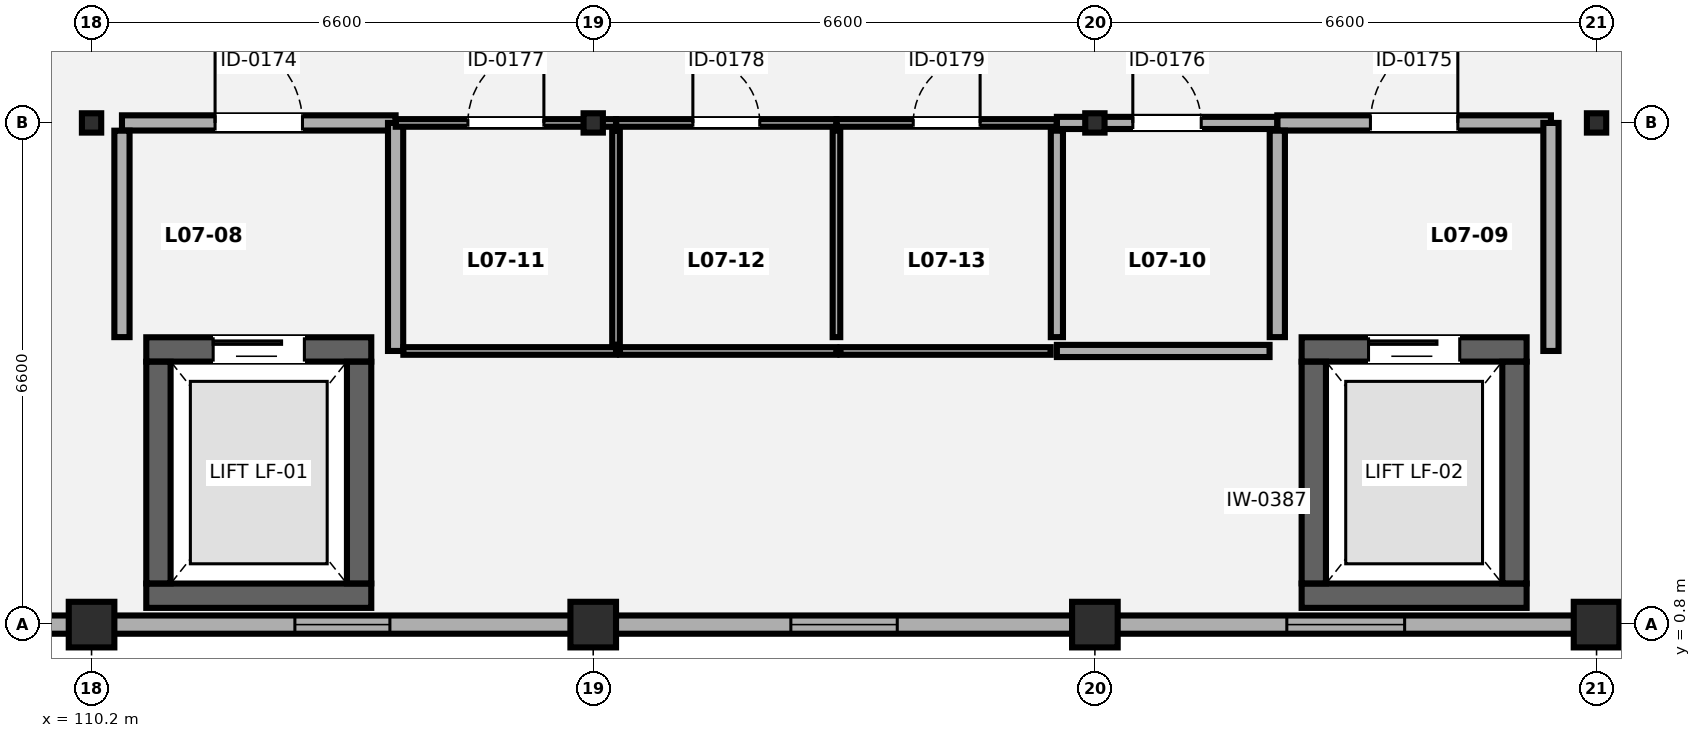
"""IFC4 building model, lengths in metres.
Left out: names, types, materials, properties, quantities, classifications, styles, units other than length and angle.
Written with IfcOpenShell. Run it as: python <this file> out.ifc"""

import sys

from ifc_helpers import new_model, si_unit, direction, frame, frame_2d, origin, origin_2d, place, context, subcontext, project, spatial, rectangle, circle, i_section, extrude, element, fill, save


model = new_model("IFC4")
c1 = context("Model", 3, precision=1e-05, world=origin(), true_north=direction((0.0, 1.0)))
c2 = subcontext(c1, "Body", "Model", "MODEL_VIEW")
j1 = project(units=[si_unit("LENGTHUNIT", "METRE"), si_unit("PLANEANGLEUNIT", "RADIAN")], contexts=[c1])
p1 = place(None, origin())
s1 = spatial("IfcSite", under=j1, at=p1, CompositionType="ELEMENT")
p2 = place(p1, origin())
s2 = spatial("IfcBuilding", under=s1, at=p2, CompositionType="ELEMENT")
p3 = place(p2, frame((0.0, 0.0, 30.1)))
s3 = spatial("IfcBuildingStorey", under=s2, at=p3, CompositionType="ELEMENT", Elevation=30.1)
p4 = place(p3, frame((110.2, 0.8, 0.0), z_axis=(0.0, 0.0, 1.0), x_axis=(1.0, 0.0, 0.0)))
e1 = element("IfcColumn", 1, at=p4, inside=s3, PredefinedType="PILASTER", context=c2, shape_type="SweptSolid", body=[
    extrude(circle(Radius=0.3, at=origin_2d()), origin(), (0.0, 0.0, 1.0), 4.2),
])
p5 = place(p3, frame((110.2, 7.4, 0.0), z_axis=(0.0, 0.0, 1.0), x_axis=(1.0, 0.0, 0.0)))
e2 = element("IfcColumn", 2, at=p5, inside=s3, PredefinedType="COLUMN", context=c2, shape_type="SweptSolid", body=[
    extrude(i_section(OverallWidth=0.254, OverallDepth=0.254, WebThickness=0.009, FlangeThickness=0.014, FilletRadius=0.014, at=origin_2d()), origin(), (0.0, 0.0, 1.0), 4.2),
])
p6 = place(p3, frame((116.8, 0.8, 0.0), z_axis=(0.0, 0.0, 1.0), x_axis=(1.0, 0.0, 0.0)))
e3 = element("IfcColumn", 3, at=p6, inside=s3, PredefinedType="PILASTER", context=c2, shape_type="SweptSolid", body=[
    extrude(circle(Radius=0.3, at=origin_2d()), origin(), (0.0, 0.0, 1.0), 4.2),
])
p7 = place(p3, frame((116.8, 7.4, 0.0), z_axis=(0.0, 0.0, 1.0), x_axis=(1.0, 0.0, 0.0)))
e4 = element("IfcColumn", 4, at=p7, inside=s3, PredefinedType="COLUMN", context=c2, shape_type="SweptSolid", body=[
    extrude(i_section(OverallWidth=0.254, OverallDepth=0.254, WebThickness=0.009, FlangeThickness=0.014, FilletRadius=0.014, at=origin_2d()), origin(), (0.0, 0.0, 1.0), 4.2),
])
p8 = place(p3, frame((123.4, 0.8, 0.0), z_axis=(0.0, 0.0, 1.0), x_axis=(1.0, 0.0, 0.0)))
e5 = element("IfcColumn", 5, at=p8, inside=s3, PredefinedType="PILASTER", context=c2, shape_type="SweptSolid", body=[
    extrude(circle(Radius=0.3, at=origin_2d()), origin(), (0.0, 0.0, 1.0), 4.2),
])
p9 = place(p3, frame((123.4, 7.4, 0.0), z_axis=(0.0, 0.0, 1.0), x_axis=(1.0, 0.0, 0.0)))
e6 = element("IfcColumn", 6, at=p9, inside=s3, PredefinedType="COLUMN", context=c2, shape_type="SweptSolid", body=[
    extrude(i_section(OverallWidth=0.254, OverallDepth=0.254, WebThickness=0.009, FlangeThickness=0.014, FilletRadius=0.014, at=origin_2d()), origin(), (0.0, 0.0, 1.0), 4.2),
])
p10 = place(p3, frame((130.0, 0.8, 0.0), z_axis=(0.0, 0.0, 1.0), x_axis=(1.0, 0.0, 0.0)))
e7 = element("IfcColumn", 7, at=p10, inside=s3, PredefinedType="PILASTER", context=c2, shape_type="SweptSolid", body=[
    extrude(circle(Radius=0.3, at=origin_2d()), origin(), (0.0, 0.0, 1.0), 4.2),
])
p11 = place(p3, frame((130.0, 7.4, 0.0), z_axis=(0.0, 0.0, 1.0), x_axis=(1.0, 0.0, 0.0)))
e8 = element("IfcColumn", 8, at=p11, inside=s3, PredefinedType="COLUMN", context=c2, shape_type="SweptSolid", body=[
    extrude(i_section(OverallWidth=0.254, OverallDepth=0.254, WebThickness=0.009, FlangeThickness=0.014, FilletRadius=0.014, at=origin_2d()), origin(), (0.0, 0.0, 1.0), 4.2),
])
p12 = place(p3, frame((156.102, 0.8, 0.0), z_axis=(0.0, 0.0, 1.0), x_axis=(-1.0, 0.0, 0.0)))
e9 = element("IfcWall", 9, at=p12, inside=s3, PredefinedType="SOLIDWALL", context=c2, shape_type="SweptSolid", body=[
    extrude(rectangle(XDim=52.204, YDim=0.24, at=frame_2d((26.102, 0.0))), origin(), (0.0, 0.0, 1.0), 3.505),
])
p13 = place(p12, frame((48.652, 0.0, 0.85)))
e10 = element("IfcOpeningElement", 10, at=p13, cuts=e9, PredefinedType="OPENING", context=c2, shape_type="SweptSolid", body=[
    extrude(rectangle(XDim=1.1, YDim=1.4, at=frame_2d((0.55, 0.7))), frame((0.0, 0.13, 0.0), z_axis=(0.0, -1.0, 0.0), x_axis=(1.0, 0.0, 0.0)), (0.0, 0.0, 1.0), 0.26),
])
p14 = place(p12, frame((41.977, 0.0, 0.85)))
e11 = element("IfcOpeningElement", 11, at=p14, cuts=e9, PredefinedType="OPENING", context=c2, shape_type="SweptSolid", body=[
    extrude(rectangle(XDim=1.25, YDim=1.4, at=frame_2d((0.625, 0.7))), frame((0.0, 0.13, 0.0), z_axis=(0.0, -1.0, 0.0), x_axis=(1.0, 0.0, 0.0)), (0.0, 0.0, 1.0), 0.26),
])
p15 = place(p12, frame((35.302, 0.0, 0.85)))
e12 = element("IfcOpeningElement", 12, at=p15, cuts=e9, PredefinedType="OPENING", context=c2, shape_type="SweptSolid", body=[
    extrude(rectangle(XDim=1.4, YDim=1.4, at=frame_2d((0.7, 0.7))), frame((0.0, 0.13, 0.0), z_axis=(0.0, -1.0, 0.0), x_axis=(1.0, 0.0, 0.0)), (0.0, 0.0, 1.0), 0.26),
])
p16 = place(p12, frame((28.627, 0.0, 0.85)))
e13 = element("IfcOpeningElement", 13, at=p16, cuts=e9, PredefinedType="OPENING", context=c2, shape_type="SweptSolid", body=[
    extrude(rectangle(XDim=1.55, YDim=1.4, at=frame_2d((0.775, 0.7))), frame((0.0, 0.13, 0.0), z_axis=(0.0, -1.0, 0.0), x_axis=(1.0, 0.0, 0.0)), (0.0, 0.0, 1.0), 0.26),
])
p17 = place(p12, frame((21.952, 0.0, 0.85)))
e14 = element("IfcOpeningElement", 14, at=p17, cuts=e9, PredefinedType="OPENING", context=c2, shape_type="SweptSolid", body=[
    extrude(rectangle(XDim=1.7, YDim=1.4, at=frame_2d((0.85, 0.7))), frame((0.0, 0.13, 0.0), z_axis=(0.0, -1.0, 0.0), x_axis=(1.0, 0.0, 0.0)), (0.0, 0.0, 1.0), 0.26),
])
p18 = place(p12, frame((15.277, 0.0, 0.85)))
e15 = element("IfcOpeningElement", 15, at=p18, cuts=e9, PredefinedType="OPENING", context=c2, shape_type="SweptSolid", body=[
    extrude(rectangle(XDim=1.85, YDim=1.4, at=frame_2d((0.925, 0.7))), frame((0.0, 0.13, 0.0), z_axis=(0.0, -1.0, 0.0), x_axis=(1.0, 0.0, 0.0)), (0.0, 0.0, 1.0), 0.26),
])
p19 = place(p12, frame((8.602, 0.0, 0.85)))
e16 = element("IfcOpeningElement", 16, at=p19, cuts=e9, PredefinedType="OPENING", context=c2, shape_type="SweptSolid", body=[
    extrude(rectangle(XDim=2.0, YDim=1.4, at=frame_2d((1.0, 0.7))), frame((0.0, 0.13, 0.0), z_axis=(0.0, -1.0, 0.0), x_axis=(1.0, 0.0, 0.0)), (0.0, 0.0, 1.0), 0.26),
])
p20 = place(p12, frame((1.927, 0.0, 0.85)))
e17 = element("IfcOpeningElement", 17, at=p20, cuts=e9, PredefinedType="OPENING", context=c2, shape_type="SweptSolid", body=[
    extrude(rectangle(XDim=2.15, YDim=1.4, at=frame_2d((1.075, 0.7))), frame((0.0, 0.13, 0.0), z_axis=(0.0, -1.0, 0.0), x_axis=(1.0, 0.0, 0.0)), (0.0, 0.0, 1.0), 0.26),
])
p21 = place(p3, frame((110.92, 1.18, 0.0), z_axis=(0.0, 0.0, 1.0), x_axis=(1.0, 0.0, 0.0)))
e18 = element("IfcWall", 18, at=p21, inside=s3, PredefinedType="SHEAR", context=c2, shape_type="SweptSolid", body=[
    extrude(rectangle(XDim=2.96, YDim=0.32, at=frame_2d((1.48, 0.0))), origin(), (0.0, 0.0, 1.0), 4.02),
])
p22 = place(p3, frame((110.92, 4.42, 0.0), z_axis=(0.0, 0.0, 1.0), x_axis=(1.0, 0.0, 0.0)))
e19 = element("IfcWall", 19, at=p22, inside=s3, PredefinedType="SHEAR", context=c2, shape_type="SweptSolid", body=[
    extrude(rectangle(XDim=2.96, YDim=0.32, at=frame_2d((1.48, 0.0))), origin(), (0.0, 0.0, 1.0), 4.02),
])
p23 = place(p22, frame((0.88, 0.0, 0.0)))
e20 = element("IfcOpeningElement", 20, at=p23, cuts=e19, PredefinedType="OPENING", context=c2, shape_type="SweptSolid", body=[
    extrude(rectangle(XDim=1.2, YDim=2.2, at=frame_2d((0.6, 1.1))), frame((0.0, 0.17, 0.0), z_axis=(0.0, -1.0, 0.0), x_axis=(1.0, 0.0, 0.0)), (0.0, 0.0, 1.0), 0.34),
])
for number, where, z_axis, x_axis in (
    (21, (111.08, 1.342, 0.0), (0.0, 0.0, 1.0), (0.0, 1.0, 0.0)),
    (22, (113.72, 1.342, 0.0), (0.0, 0.0, 1.0), (0.0, 1.0, 0.0)),
):
    element("IfcWall", number, at=place(p3, frame(where, z_axis=z_axis, x_axis=x_axis)), inside=s3, PredefinedType="SHEAR", context=c2, shape_type="SweptSolid", body=[
        extrude(rectangle(XDim=2.916, YDim=0.32, at=frame_2d((1.458, 0.0))), origin(), (0.0, 0.0, 1.0), 4.02),
    ])
p24 = place(p3, frame((126.12, 1.18, 0.0), z_axis=(0.0, 0.0, 1.0), x_axis=(1.0, 0.0, 0.0)))
e23 = element("IfcWall", 23, at=p24, inside=s3, PredefinedType="SHEAR", context=c2, shape_type="SweptSolid", body=[
    extrude(rectangle(XDim=2.96, YDim=0.32, at=frame_2d((1.48, 0.0))), origin(), (0.0, 0.0, 1.0), 4.02),
])
p25 = place(p3, frame((126.12, 4.42, 0.0), z_axis=(0.0, 0.0, 1.0), x_axis=(1.0, 0.0, 0.0)))
e24 = element("IfcWall", 24, at=p25, inside=s3, PredefinedType="SHEAR", context=c2, shape_type="SweptSolid", body=[
    extrude(rectangle(XDim=2.96, YDim=0.32, at=frame_2d((1.48, 0.0))), origin(), (0.0, 0.0, 1.0), 4.02),
])
p26 = place(p25, frame((0.88, 0.0, 0.0)))
e25 = element("IfcOpeningElement", 25, at=p26, cuts=e24, PredefinedType="OPENING", context=c2, shape_type="SweptSolid", body=[
    extrude(rectangle(XDim=1.2, YDim=2.2, at=frame_2d((0.6, 1.1))), frame((0.0, 0.17, 0.0), z_axis=(0.0, -1.0, 0.0), x_axis=(1.0, 0.0, 0.0)), (0.0, 0.0, 1.0), 0.34),
])
for number, where, z_axis, x_axis in (
    (26, (126.28, 1.342, 0.0), (0.0, 0.0, 1.0), (0.0, 1.0, 0.0)),
    (27, (128.92, 1.342, 0.0), (0.0, 0.0, 1.0), (0.0, 1.0, 0.0)),
):
    element("IfcWall", number, at=place(p3, frame(where, z_axis=z_axis, x_axis=x_axis)), inside=s3, PredefinedType="SHEAR", context=c2, shape_type="SweptSolid", body=[
        extrude(rectangle(XDim=2.916, YDim=0.32, at=frame_2d((1.458, 0.0))), origin(), (0.0, 0.0, 1.0), 4.02),
    ])
p27 = place(p3, frame((110.6, 7.4, 0.0), z_axis=(0.0, 0.0, 1.0), x_axis=(1.0, 0.0, 0.0)))
e28 = element("IfcWall", 28, at=p27, inside=s3, PredefinedType="SOLIDWALL", context=c2, shape_type="SweptSolid", body=[
    extrude(rectangle(XDim=3.6, YDim=0.2, at=frame_2d((1.8, 0.0))), origin(), (0.0, 0.0, 1.0), 3.293),
])
p28 = place(p27, frame((1.225, 0.0, 0.0)))
e29 = element("IfcOpeningElement", 29, at=p28, cuts=e28, PredefinedType="OPENING", context=c2, shape_type="SweptSolid", body=[
    extrude(rectangle(XDim=1.15, YDim=2.15, at=frame_2d((0.575, 1.075))), frame((0.0, 0.11, 0.0), z_axis=(0.0, -1.0, 0.0), x_axis=(1.0, 0.0, 0.0)), (0.0, 0.0, 1.0), 0.22),
])
p29 = place(p3, frame((110.6, 4.582, 0.0), z_axis=(0.0, 0.0, 1.0), x_axis=(0.0, 1.0, 0.0)))
e30 = element("IfcWall", 30, at=p29, inside=s3, PredefinedType="SOLIDWALL", context=c2, shape_type="SweptSolid", body=[
    extrude(rectangle(XDim=2.716, YDim=0.2, at=frame_2d((1.358, 0.0))), origin(), (0.0, 0.0, 1.0), 4.02),
])
p30 = place(p3, frame((114.2, 4.4, 0.0), z_axis=(0.0, 0.0, 1.0), x_axis=(0.0, 1.0, 0.0)))
e31 = element("IfcWall", 31, at=p30, inside=s3, PredefinedType="SOLIDWALL", context=c2, shape_type="SweptSolid", body=[
    extrude(rectangle(XDim=3.0, YDim=0.2, at=frame_2d((1.5, 0.0))), origin(), (0.0, 0.0, 1.0), 4.02),
])
p31 = place(p3, frame((125.8, 7.4, 0.0), z_axis=(0.0, 0.0, 1.0), x_axis=(1.0, 0.0, 0.0)))
e32 = element("IfcWall", 32, at=p31, inside=s3, PredefinedType="SOLIDWALL", context=c2, shape_type="SweptSolid", body=[
    extrude(rectangle(XDim=3.6, YDim=0.2, at=frame_2d((1.8, 0.0))), origin(), (0.0, 0.0, 1.0), 3.293),
])
p32 = place(p31, frame((1.225, 0.0, 0.0)))
e33 = element("IfcOpeningElement", 33, at=p32, cuts=e32, PredefinedType="OPENING", context=c2, shape_type="SweptSolid", body=[
    extrude(rectangle(XDim=1.15, YDim=2.15, at=frame_2d((0.575, 1.075))), frame((0.0, 0.11, 0.0), z_axis=(0.0, -1.0, 0.0), x_axis=(1.0, 0.0, 0.0)), (0.0, 0.0, 1.0), 0.22),
])
p33 = place(p3, frame((125.8, 4.582, 0.0), z_axis=(0.0, 0.0, 1.0), x_axis=(0.0, 1.0, 0.0)))
e34 = element("IfcWall", 34, at=p33, inside=s3, PredefinedType="SOLIDWALL", context=c2, shape_type="SweptSolid", body=[
    extrude(rectangle(XDim=2.716, YDim=0.2, at=frame_2d((1.358, 0.0))), origin(), (0.0, 0.0, 1.0), 4.02),
])
p34 = place(p3, frame((129.4, 4.4, 0.0), z_axis=(0.0, 0.0, 1.0), x_axis=(0.0, 1.0, 0.0)))
e35 = element("IfcWall", 35, at=p34, inside=s3, PredefinedType="SOLIDWALL", context=c2, shape_type="SweptSolid", body=[
    extrude(rectangle(XDim=3.0, YDim=0.2, at=frame_2d((1.5, 0.0))), origin(), (0.0, 0.0, 1.0), 4.02),
])
p35 = place(p3, frame((122.9, 4.4, 0.0), z_axis=(0.0, 0.0, 1.0), x_axis=(1.0, 0.0, 0.0)))
e36 = element("IfcWall", 36, at=p35, inside=s3, PredefinedType="PARTITIONING", context=c2, shape_type="SweptSolid", body=[
    extrude(rectangle(XDim=2.798, YDim=0.16, at=frame_2d((1.399, 0.0))), origin(), (0.0, 0.0, 1.0), 3.546),
])
p36 = place(p3, frame((122.9, 7.4, 0.0), z_axis=(0.0, 0.0, 1.0), x_axis=(1.0, 0.0, 0.0)))
e37 = element("IfcWall", 37, at=p36, inside=s3, PredefinedType="PARTITIONING", context=c2, shape_type="SweptSolid", body=[
    extrude(rectangle(XDim=2.898, YDim=0.16, at=frame_2d((1.449, 0.0))), origin(), (0.0, 0.0, 1.0), 3.293),
])
p37 = place(p36, frame((0.999, 0.0, 0.0)))
e38 = element("IfcOpeningElement", 38, at=p37, cuts=e37, PredefinedType="OPENING", context=c2, shape_type="SweptSolid", body=[
    extrude(rectangle(XDim=0.9, YDim=2.1, at=frame_2d((0.45, 1.05))), frame((0.0, 0.09, 0.0), z_axis=(0.0, -1.0, 0.0), x_axis=(1.0, 0.0, 0.0)), (0.0, 0.0, 1.0), 0.18),
])
p38 = place(p3, frame((122.9, 4.582, 0.0), z_axis=(0.0, 0.0, 1.0), x_axis=(0.0, 1.0, 0.0)))
e39 = element("IfcWall", 39, at=p38, inside=s3, PredefinedType="PARTITIONING", context=c2, shape_type="SweptSolid", body=[
    extrude(rectangle(XDim=2.716, YDim=0.16, at=frame_2d((1.358, 0.0))), origin(), (0.0, 0.0, 1.0), 4.02),
])
p39 = place(p3, frame((114.302, 4.4, 0.0), z_axis=(0.0, 0.0, 1.0), x_axis=(1.0, 0.0, 0.0)))
e40 = element("IfcWall", 40, at=p39, inside=s3, PredefinedType="PARTITIONING", context=c2, shape_type="SweptSolid", body=[
    extrude(rectangle(XDim=2.798, YDim=0.1, at=frame_2d((1.399, 0.0))), origin(), (0.0, 0.0, 1.0), 4.02),
])
p40 = place(p3, frame((114.202, 7.4, 0.0), z_axis=(0.0, 0.0, 1.0), x_axis=(1.0, 0.0, 0.0)))
e41 = element("IfcWall", 41, at=p40, inside=s3, PredefinedType="PARTITIONING", context=c2, shape_type="SweptSolid", body=[
    extrude(rectangle(XDim=2.898, YDim=0.1, at=frame_2d((1.449, 0.0))), origin(), (0.0, 0.0, 1.0), 3.293),
])
p41 = place(p40, frame((0.949, 0.0, 0.0)))
e42 = element("IfcOpeningElement", 42, at=p41, cuts=e41, PredefinedType="OPENING", context=c2, shape_type="SweptSolid", body=[
    extrude(rectangle(XDim=1.0, YDim=2.1, at=frame_2d((0.5, 1.05))), frame((0.0, 0.06, 0.0), z_axis=(0.0, -1.0, 0.0), x_axis=(1.0, 0.0, 0.0)), (0.0, 0.0, 1.0), 0.12),
])
p42 = place(p3, frame((117.1, 4.482, 0.0), z_axis=(0.0, 0.0, 1.0), x_axis=(0.0, 1.0, 0.0)))
e43 = element("IfcWall", 43, at=p42, inside=s3, PredefinedType="PARTITIONING", context=c2, shape_type="SweptSolid", body=[
    extrude(rectangle(XDim=2.816, YDim=0.1, at=frame_2d((1.408, 0.0))), origin(), (0.0, 0.0, 1.0), 4.02),
])
p43 = place(p3, frame((117.152, 4.4, 0.0), z_axis=(0.0, 0.0, 1.0), x_axis=(1.0, 0.0, 0.0)))
e44 = element("IfcWall", 44, at=p43, inside=s3, PredefinedType="PARTITIONING", context=c2, shape_type="SweptSolid", body=[
    extrude(rectangle(XDim=2.848, YDim=0.1, at=frame_2d((1.424, 0.0))), origin(), (0.0, 0.0, 1.0), 4.02),
])
p44 = place(p3, frame((117.102, 7.4, 0.0), z_axis=(0.0, 0.0, 1.0), x_axis=(1.0, 0.0, 0.0)))
e45 = element("IfcWall", 45, at=p44, inside=s3, PredefinedType="PARTITIONING", context=c2, shape_type="SweptSolid", body=[
    extrude(rectangle(XDim=2.898, YDim=0.1, at=frame_2d((1.449, 0.0))), origin(), (0.0, 0.0, 1.0), 3.293),
])
p45 = place(p44, frame((1.009, 0.0, 0.0)))
e46 = element("IfcOpeningElement", 46, at=p45, cuts=e45, PredefinedType="OPENING", context=c2, shape_type="SweptSolid", body=[
    extrude(rectangle(XDim=0.88, YDim=2.08, at=frame_2d((0.44, 1.04))), frame((0.0, 0.06, 0.0), z_axis=(0.0, -1.0, 0.0), x_axis=(1.0, 0.0, 0.0)), (0.0, 0.0, 1.0), 0.12),
])
p46 = place(p3, frame((120.0, 4.582, 0.0), z_axis=(0.0, 0.0, 1.0), x_axis=(0.0, 1.0, 0.0)))
e47 = element("IfcWall", 47, at=p46, inside=s3, PredefinedType="PARTITIONING", context=c2, shape_type="SweptSolid", body=[
    extrude(rectangle(XDim=2.716, YDim=0.1, at=frame_2d((1.358, 0.0))), origin(), (0.0, 0.0, 1.0), 4.02),
])
p47 = place(p3, frame((120.052, 4.4, 0.0), z_axis=(0.0, 0.0, 1.0), x_axis=(1.0, 0.0, 0.0)))
e48 = element("IfcWall", 48, at=p47, inside=s3, PredefinedType="PARTITIONING", context=c2, shape_type="SweptSolid", body=[
    extrude(rectangle(XDim=2.766, YDim=0.1, at=frame_2d((1.383, 0.0))), origin(), (0.0, 0.0, 1.0), 4.02),
])
p48 = place(p3, frame((120.002, 7.4, 0.0), z_axis=(0.0, 0.0, 1.0), x_axis=(1.0, 0.0, 0.0)))
e49 = element("IfcWall", 49, at=p48, inside=s3, PredefinedType="PARTITIONING", context=c2, shape_type="SweptSolid", body=[
    extrude(rectangle(XDim=2.896, YDim=0.1, at=frame_2d((1.448, 0.0))), origin(), (0.0, 0.0, 1.0), 3.293),
])
p49 = place(p48, frame((1.008, 0.0, 0.0)))
e50 = element("IfcOpeningElement", 50, at=p49, cuts=e49, PredefinedType="OPENING", context=c2, shape_type="SweptSolid", body=[
    extrude(rectangle(XDim=0.88, YDim=2.08, at=frame_2d((0.44, 1.04))), frame((0.0, 0.06, 0.0), z_axis=(0.0, -1.0, 0.0), x_axis=(1.0, 0.0, 0.0)), (0.0, 0.0, 1.0), 0.12),
])
p50 = place(p14, origin())
e51 = element("IfcWindow", 51, at=p50, inside=s3, PartitioningType="SINGLE_PANEL", PredefinedType="WINDOW", context=c2, shape_type="SweptSolid", body=[
    extrude(rectangle(XDim=1.25, YDim=1.4, at=frame_2d((0.625, 0.7))), frame((0.0, 0.03, 0.0), z_axis=(0.0, -1.0, 0.0), x_axis=(1.0, 0.0, 0.0)), (0.0, 0.0, 1.0), 0.06),
])
fill(e11, e51)
p51 = place(p15, origin())
e52 = element("IfcWindow", 52, at=p51, inside=s3, PartitioningType="SINGLE_PANEL", PredefinedType="WINDOW", context=c2, shape_type="SweptSolid", body=[
    extrude(rectangle(XDim=1.4, YDim=1.4, at=frame_2d((0.7, 0.7))), frame((0.0, 0.03, 0.0), z_axis=(0.0, -1.0, 0.0), x_axis=(1.0, 0.0, 0.0)), (0.0, 0.0, 1.0), 0.06),
])
fill(e12, e52)
p52 = place(p16, origin())
e53 = element("IfcWindow", 53, at=p52, inside=s3, PartitioningType="SINGLE_PANEL", PredefinedType="WINDOW", context=c2, shape_type="SweptSolid", body=[
    extrude(rectangle(XDim=1.55, YDim=1.4, at=frame_2d((0.775, 0.7))), frame((0.0, 0.03, 0.0), z_axis=(0.0, -1.0, 0.0), x_axis=(1.0, 0.0, 0.0)), (0.0, 0.0, 1.0), 0.06),
])
fill(e13, e53)
p53 = place(p23, origin())
e54 = element("IfcDoor", 54, at=p53, inside=s3, OperationType="SLIDING_TO_LEFT", PredefinedType="DOOR", context=c2, shape_type="SweptSolid", body=[
    extrude(rectangle(XDim=1.2, YDim=2.2, at=frame_2d((0.6, 1.1))), frame((0.0, 0.025, 0.0), z_axis=(0.0, -1.0, 0.0), x_axis=(1.0, 0.0, 0.0)), (0.0, 0.0, 1.0), 0.05),
])
fill(e20, e54)
p54 = place(p26, origin())
e55 = element("IfcDoor", 55, at=p54, inside=s3, OperationType="SLIDING_TO_LEFT", PredefinedType="DOOR", context=c2, shape_type="SweptSolid", body=[
    extrude(rectangle(XDim=1.2, YDim=2.2, at=frame_2d((0.6, 1.1))), frame((0.0, 0.025, 0.0), z_axis=(0.0, -1.0, 0.0), x_axis=(1.0, 0.0, 0.0)), (0.0, 0.0, 1.0), 0.05),
])
fill(e25, e55)
p55 = place(p28, origin())
e56 = element("IfcDoor", 56, at=p55, inside=s3, OperationType="SINGLE_SWING_LEFT", PredefinedType="DOOR", context=c2, shape_type="SweptSolid", body=[
    extrude(rectangle(XDim=1.15, YDim=2.15, at=frame_2d((0.575, 1.075))), frame((0.0, 0.025, 0.0), z_axis=(0.0, -1.0, 0.0), x_axis=(1.0, 0.0, 0.0)), (0.0, 0.0, 1.0), 0.05),
])
fill(e29, e56)
p56 = place(p32, origin())
e57 = element("IfcDoor", 57, at=p56, inside=s3, OperationType="SINGLE_SWING_RIGHT", PredefinedType="DOOR", context=c2, shape_type="SweptSolid", body=[
    extrude(rectangle(XDim=1.15, YDim=2.15, at=frame_2d((0.575, 1.075))), frame((0.0, 0.025, 0.0), z_axis=(0.0, -1.0, 0.0), x_axis=(1.0, 0.0, 0.0)), (0.0, 0.0, 1.0), 0.05),
])
fill(e33, e57)
p57 = place(p37, origin())
e58 = element("IfcDoor", 58, at=p57, inside=s3, OperationType="SINGLE_SWING_LEFT", PredefinedType="DOOR", context=c2, shape_type="SweptSolid", body=[
    extrude(rectangle(XDim=0.9, YDim=2.1, at=frame_2d((0.45, 1.05))), frame((0.0, 0.025, 0.0), z_axis=(0.0, -1.0, 0.0), x_axis=(1.0, 0.0, 0.0)), (0.0, 0.0, 1.0), 0.05),
])
fill(e38, e58)
p58 = place(p41, origin())
e59 = element("IfcDoor", 59, at=p58, inside=s3, OperationType="SINGLE_SWING_RIGHT", PredefinedType="DOOR", context=c2, shape_type="SweptSolid", body=[
    extrude(rectangle(XDim=1.0, YDim=2.1, at=frame_2d((0.5, 1.05))), frame((0.0, 0.025, 0.0), z_axis=(0.0, -1.0, 0.0), x_axis=(1.0, 0.0, 0.0)), (0.0, 0.0, 1.0), 0.05),
])
fill(e42, e59)
p59 = place(p45, origin())
e60 = element("IfcDoor", 60, at=p59, inside=s3, OperationType="SINGLE_SWING_LEFT", PredefinedType="DOOR", context=c2, shape_type="SweptSolid", body=[
    extrude(rectangle(XDim=0.88, YDim=2.08, at=frame_2d((0.44, 1.04))), frame((0.0, 0.025, 0.0), z_axis=(0.0, -1.0, 0.0), x_axis=(1.0, 0.0, 0.0)), (0.0, 0.0, 1.0), 0.05),
])
fill(e46, e60)
p60 = place(p49, origin())
e61 = element("IfcDoor", 61, at=p60, inside=s3, OperationType="SINGLE_SWING_RIGHT", PredefinedType="DOOR", context=c2, shape_type="SweptSolid", body=[
    extrude(rectangle(XDim=0.88, YDim=2.08, at=frame_2d((0.44, 1.04))), frame((0.0, 0.025, 0.0), z_axis=(0.0, -1.0, 0.0), x_axis=(1.0, 0.0, 0.0)), (0.0, 0.0, 1.0), 0.05),
])
fill(e50, e61)
save(model, sys.argv[1])
